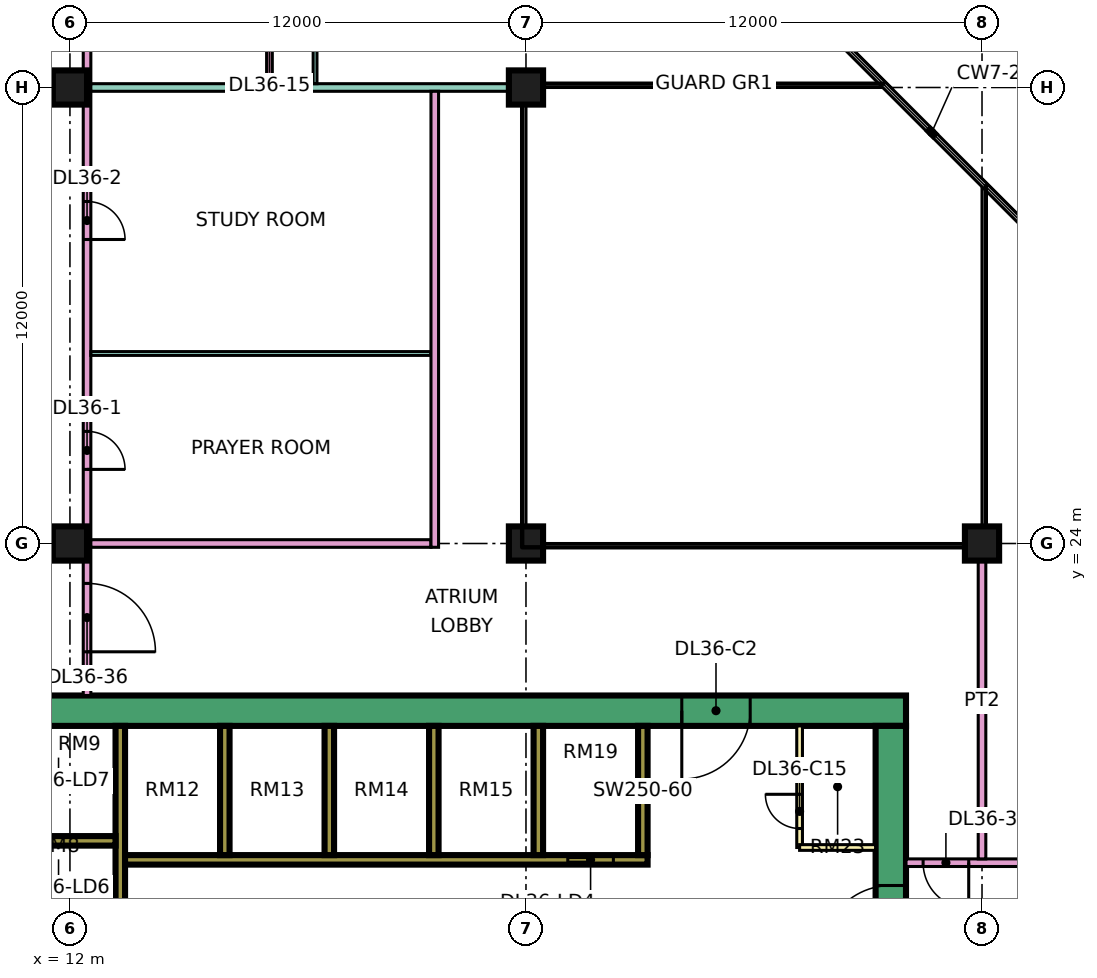
"""IFC4 building model, lengths in metres.
Left out: names, types, materials, properties, quantities, classifications, styles, units other than length and angle.
Written with IfcOpenShell. Run it as: python <this file> out.ifc"""

import sys

from ifc_helpers import new_model, si_unit, direction, frame, frame_2d, origin, origin_2d, place, context, subcontext, project, spatial, rectangle, extrude, element, fill, save


model = new_model("IFC4")
c1 = context("Model", 3, precision=1e-05, world=origin(), true_north=direction((0.0, 1.0)))
c2 = subcontext(c1, "Body", "Model", "MODEL_VIEW")
j1 = project(units=[si_unit("LENGTHUNIT", "METRE"), si_unit("PLANEANGLEUNIT", "RADIAN")], contexts=[c1])
p1 = place(None, origin())
s1 = spatial("IfcSite", under=j1, at=p1, CompositionType="ELEMENT")
p2 = place(p1, origin())
s2 = spatial("IfcBuilding", under=s1, at=p2, CompositionType="ELEMENT")
p3 = place(p2, frame((0.0, 0.0, 161.15)))
s3 = spatial("IfcBuildingStorey", under=s2, at=p3, CompositionType="ELEMENT", Elevation=161.15)
for number, where, z_axis, x_axis in (
    (1, (12.0, 24.0, 0.0), (0.0, 0.0, 1.0), (1.0, 0.0, 0.0)),
    (2, (12.0, 36.0, 0.0), (0.0, 0.0, 1.0), (1.0, 0.0, 0.0)),
    (3, (24.0, 24.0, 0.0), (0.0, 0.0, 1.0), (1.0, 0.0, 0.0)),
    (4, (24.0, 36.0, 0.0), (0.0, 0.0, 1.0), (1.0, 0.0, 0.0)),
    (5, (36.0, 24.0, 0.0), (0.0, 0.0, 1.0), (1.0, 0.0, 0.0)),
):
    element("IfcColumn", number, at=place(p3, frame(where, z_axis=z_axis, x_axis=x_axis)), inside=s3, PredefinedType="COLUMN", context=c2, shape_type="SweptSolid", body=[
        extrude(rectangle(XDim=0.9, YDim=0.9, at=origin_2d()), origin(), (0.0, 0.0, 1.0), 3.75),
    ])
p4 = place(p3, frame((9.0, 19.6, 0.0), z_axis=(0.0, 0.0, 1.0), x_axis=(1.0, 0.0, 0.0)))
e6 = element("IfcWall", 6, at=p4, inside=s3, PredefinedType="SHEAR", context=c2, shape_type="SweptSolid", body=[
    extrude(rectangle(XDim=25.0, YDim=0.8, at=frame_2d((12.5, 0.0))), origin(), (0.0, 0.0, 1.0), 3.75),
])
p5 = place(p4, frame((19.1, 0.0, 0.0)))
e7 = element("IfcOpeningElement", 7, at=p5, cuts=e6, PredefinedType="OPENING", context=c2, shape_type="SweptSolid", body=[
    extrude(rectangle(XDim=1.8, YDim=2.4, at=frame_2d((0.9, 1.2))), frame((0.0, 0.41, 0.0), z_axis=(0.0, -1.0, 0.0), x_axis=(1.0, 0.0, 0.0)), (0.0, 0.0, 1.0), 0.82),
])
p6 = place(p3, frame((33.6, 7.8, 0.0), z_axis=(0.0, 0.0, 1.0), x_axis=(0.0, 1.0, 0.0)))
e8 = element("IfcWall", 8, at=p6, inside=s3, PredefinedType="SHEAR", context=c2, shape_type="SweptSolid", body=[
    extrude(rectangle(XDim=11.4, YDim=0.8, at=frame_2d((5.7, 0.0))), origin(), (0.0, 0.0, 1.0), 3.75),
])
p7 = place(p6, frame((5.4, 0.0, 0.0)))
e9 = element("IfcOpeningElement", 9, at=p7, cuts=e8, PredefinedType="OPENING", context=c2, shape_type="SweptSolid", body=[
    extrude(rectangle(XDim=1.8, YDim=2.4, at=frame_2d((0.9, 1.2))), frame((0.0, 0.41, 0.0), z_axis=(0.0, -1.0, 0.0), x_axis=(1.0, 0.0, 0.0)), (0.0, 0.0, 1.0), 0.82),
])
p8 = place(p3, frame((13.325, 7.8, 0.0), z_axis=(0.0, 0.0, 1.0), x_axis=(0.0, 1.0, 0.0)))
e10 = element("IfcWall", 10, at=p8, inside=s3, PredefinedType="SHEAR", context=c2, shape_type="SweptSolid", body=[
    extrude(rectangle(XDim=11.4, YDim=0.25, at=frame_2d((5.7, 0.0))), origin(), (0.0, 0.0, 1.0), 3.75),
])
p9 = place(p3, frame((13.45, 15.675, 0.0), z_axis=(0.0, 0.0, 1.0), x_axis=(1.0, 0.0, 0.0)))
e11 = element("IfcWall", 11, at=p9, inside=s3, PredefinedType="SHEAR", context=c2, shape_type="SweptSolid", body=[
    extrude(rectangle(XDim=13.75, YDim=0.25, at=frame_2d((6.875, 0.0))), origin(), (0.0, 0.0, 1.0), 3.75),
])
p10 = place(p9, frame((11.65, 0.0, 0.0)))
e12 = element("IfcOpeningElement", 12, at=p10, cuts=e11, PredefinedType="OPENING", context=c2, shape_type="SweptSolid", body=[
    extrude(rectangle(XDim=1.2, YDim=2.2, at=frame_2d((0.6, 1.1))), frame((0.0, 0.135, 0.0), z_axis=(0.0, -1.0, 0.0), x_axis=(1.0, 0.0, 0.0)), (0.0, 0.0, 1.0), 0.27),
])
p11 = place(p3, frame((10.2, 16.175, 0.0), z_axis=(0.0, 0.0, 1.0), x_axis=(1.0, 0.0, 0.0)))
e13 = element("IfcWall", 13, at=p11, inside=s3, PredefinedType="SHEAR", context=c2, shape_type="SweptSolid", body=[
    extrude(rectangle(XDim=3.0, YDim=0.25, at=frame_2d((1.5, 0.0))), origin(), (0.0, 0.0, 1.0), 3.75),
])
for number, where, z_axis, x_axis in (
    (14, (16.075, 15.8, 0.0), (0.0, 0.0, 1.0), (0.0, 1.0, 0.0)),
    (15, (18.825, 15.8, 0.0), (0.0, 0.0, 1.0), (0.0, 1.0, 0.0)),
    (16, (21.575, 15.8, 0.0), (0.0, 0.0, 1.0), (0.0, 1.0, 0.0)),
    (17, (24.325, 15.8, 0.0), (0.0, 0.0, 1.0), (0.0, 1.0, 0.0)),
    (18, (27.075, 15.8, 0.0), (0.0, 0.0, 1.0), (0.0, 1.0, 0.0)),
):
    element("IfcWall", number, at=place(p3, frame(where, z_axis=z_axis, x_axis=x_axis)), inside=s3, PredefinedType="SHEAR", context=c2, shape_type="SweptSolid", body=[
        extrude(rectangle(XDim=3.4, YDim=0.25, at=frame_2d((1.7, 0.0))), origin(), (0.0, 0.0, 1.0), 3.75),
    ])
p12 = place(p3, frame((31.2, 16.0, 0.0), z_axis=(0.0, 0.0, 1.0), x_axis=(0.0, 1.0, 0.0)))
e19 = element("IfcWall", 19, at=p12, inside=s3, PredefinedType="PARTITIONING", context=c2, shape_type="SweptSolid", body=[
    extrude(rectangle(XDim=3.2, YDim=0.15, at=frame_2d((1.6, 0.0))), origin(), (0.0, 0.0, 1.0), 3.35),
])
p13 = place(p12, frame((0.5, 0.0, 0.0)))
e20 = element("IfcOpeningElement", 20, at=p13, cuts=e19, PredefinedType="OPENING", context=c2, shape_type="SweptSolid", body=[
    extrude(rectangle(XDim=0.9, YDim=2.1, at=frame_2d((0.45, 1.05))), frame((0.0, 0.085, 0.0), z_axis=(0.0, -1.0, 0.0), x_axis=(1.0, 0.0, 0.0)), (0.0, 0.0, 1.0), 0.17),
])
p14 = place(p3, frame((31.2, 16.0, 0.0), z_axis=(0.0, 0.0, 1.0), x_axis=(1.0, 0.0, 0.0)))
e21 = element("IfcWall", 21, at=p14, inside=s3, PredefinedType="PARTITIONING", context=c2, shape_type="SweptSolid", body=[
    extrude(rectangle(XDim=2.0, YDim=0.15, at=frame_2d((1.0, 0.0))), origin(), (0.0, 0.0, 1.0), 3.35),
])
p15 = place(p3, frame((12.45, 20.0, 0.0), z_axis=(0.0, 0.0, 1.0), x_axis=(0.0, 1.0, 0.0)))
e22 = element("IfcWall", 22, at=p15, inside=s3, PredefinedType="PARTITIONING", context=c2, shape_type="SweptSolid", body=[
    extrude(rectangle(XDim=43.0, YDim=0.2, at=frame_2d((21.5, 0.0))), origin(), (0.0, 0.0, 1.0), 3.35),
])
p16 = place(p15, frame((5.95, 0.0, 0.0)))
e23 = element("IfcOpeningElement", 23, at=p16, cuts=e22, PredefinedType="OPENING", context=c2, shape_type="SweptSolid", body=[
    extrude(rectangle(XDim=1.0, YDim=2.1, at=frame_2d((0.5, 1.05))), frame((0.0, 0.11, 0.0), z_axis=(0.0, -1.0, 0.0), x_axis=(1.0, 0.0, 0.0)), (0.0, 0.0, 1.0), 0.22),
])
p17 = place(p15, frame((12.0, 0.0, 0.0)))
e24 = element("IfcOpeningElement", 24, at=p17, cuts=e22, PredefinedType="OPENING", context=c2, shape_type="SweptSolid", body=[
    extrude(rectangle(XDim=1.0, YDim=2.1, at=frame_2d((0.5, 1.05))), frame((0.0, 0.11, 0.0), z_axis=(0.0, -1.0, 0.0), x_axis=(1.0, 0.0, 0.0)), (0.0, 0.0, 1.0), 0.22),
])
p18 = place(p15, frame((23.35, 0.0, 0.0)))
e25 = element("IfcOpeningElement", 25, at=p18, cuts=e22, PredefinedType="OPENING", context=c2, shape_type="SweptSolid", body=[
    extrude(rectangle(XDim=1.0, YDim=2.1, at=frame_2d((0.5, 1.05))), frame((0.0, 0.11, 0.0), z_axis=(0.0, -1.0, 0.0), x_axis=(1.0, 0.0, 0.0)), (0.0, 0.0, 1.0), 0.22),
])
p19 = place(p15, frame((35.2, 0.0, 0.0)))
e26 = element("IfcOpeningElement", 26, at=p19, cuts=e22, PredefinedType="OPENING", context=c2, shape_type="SweptSolid", body=[
    extrude(rectangle(XDim=1.0, YDim=2.1, at=frame_2d((0.5, 1.05))), frame((0.0, 0.11, 0.0), z_axis=(0.0, -1.0, 0.0), x_axis=(1.0, 0.0, 0.0)), (0.0, 0.0, 1.0), 0.22),
])
p20 = place(p15, frame((1.15, 0.0, 0.0)))
e27 = element("IfcOpeningElement", 27, at=p20, cuts=e22, PredefinedType="OPENING", context=c2, shape_type="SweptSolid", body=[
    extrude(rectangle(XDim=1.8, YDim=2.1, at=frame_2d((0.9, 1.05))), frame((0.0, 0.11, 0.0), z_axis=(0.0, -1.0, 0.0), x_axis=(1.0, 0.0, 0.0)), (0.0, 0.0, 1.0), 0.22),
])
p21 = place(p15, frame((28.6, 0.0, 0.0)))
e28 = element("IfcOpeningElement", 28, at=p21, cuts=e22, PredefinedType="OPENING", context=c2, shape_type="SweptSolid", body=[
    extrude(rectangle(XDim=1.8, YDim=2.1, at=frame_2d((0.9, 1.05))), frame((0.0, 0.11, 0.0), z_axis=(0.0, -1.0, 0.0), x_axis=(1.0, 0.0, 0.0)), (0.0, 0.0, 1.0), 0.22),
])
p22 = place(p3, frame((12.55, 24.0, 0.0), z_axis=(0.0, 0.0, 1.0), x_axis=(1.0, 0.0, 0.0)))
e29 = element("IfcWall", 29, at=p22, inside=s3, PredefinedType="PARTITIONING", context=c2, shape_type="SweptSolid", body=[
    extrude(rectangle(XDim=8.95, YDim=0.2, at=frame_2d((4.475, 0.0))), origin(), (0.0, 0.0, 1.0), 3.35),
])
p23 = place(p3, frame((12.55, 29.0, 0.0), z_axis=(0.0, 0.0, 1.0), x_axis=(1.0, 0.0, 0.0)))
e30 = element("IfcWall", 30, at=p23, inside=s3, PredefinedType="PARTITIONING", context=c2, shape_type="SweptSolid", body=[
    extrude(rectangle(XDim=8.95, YDim=0.1, at=frame_2d((4.475, 0.0))), origin(), (0.0, 0.0, 1.0), 3.35),
])
p24 = place(p3, frame((12.55, 36.0, 0.0), z_axis=(0.0, 0.0, 1.0), x_axis=(1.0, 0.0, 0.0)))
e31 = element("IfcWall", 31, at=p24, inside=s3, PredefinedType="PARTITIONING", context=c2, shape_type="SweptSolid", body=[
    extrude(rectangle(XDim=11.45, YDim=0.2, at=frame_2d((5.725, 0.0))), origin(), (0.0, 0.0, 1.0), 3.35),
])
p25 = place(p3, frame((17.25, 36.1, 0.0), z_axis=(0.0, 0.0, 1.0), x_axis=(0.0, 1.0, 0.0)))
e32 = element("IfcWall", 32, at=p25, inside=s3, PredefinedType="PARTITIONING", context=c2, shape_type="SweptSolid", body=[
    extrude(rectangle(XDim=6.575, YDim=0.15, at=frame_2d((3.288, 0.0))), origin(), (0.0, 0.0, 1.0), 3.35),
])
p26 = place(p25, frame((1.1, 0.0, 0.0)))
e33 = element("IfcOpeningElement", 33, at=p26, cuts=e32, PredefinedType="OPENING", context=c2, shape_type="SweptSolid", body=[
    extrude(rectangle(XDim=0.9, YDim=2.1, at=frame_2d((0.45, 1.05))), frame((0.0, 0.085, 0.0), z_axis=(0.0, -1.0, 0.0), x_axis=(1.0, 0.0, 0.0)), (0.0, 0.0, 1.0), 0.17),
])
p27 = place(p3, frame((18.45, 36.1, 0.0), z_axis=(0.0, 0.0, 1.0), x_axis=(0.0, 1.0, 0.0)))
e34 = element("IfcWall", 34, at=p27, inside=s3, PredefinedType="PARTITIONING", context=c2, shape_type="SweptSolid", body=[
    extrude(rectangle(XDim=2.85, YDim=0.1, at=frame_2d((1.425, 0.0))), origin(), (0.0, 0.0, 1.0), 3.35),
])
p28 = place(p27, frame((0.95, 0.0, 0.0)))
e35 = element("IfcOpeningElement", 35, at=p28, cuts=e34, PredefinedType="OPENING", context=c2, shape_type="SweptSolid", body=[
    extrude(rectangle(XDim=0.9, YDim=2.1, at=frame_2d((0.45, 1.05))), frame((0.0, 0.06, 0.0), z_axis=(0.0, -1.0, 0.0), x_axis=(1.0, 0.0, 0.0)), (0.0, 0.0, 1.0), 0.12),
])
p29 = place(p3, frame((21.6, 23.9, 0.0), z_axis=(0.0, 0.0, 1.0), x_axis=(0.0, 1.0, 0.0)))
e36 = element("IfcWall", 36, at=p29, inside=s3, PredefinedType="PARTITIONING", context=c2, shape_type="SweptSolid", body=[
    extrude(rectangle(XDim=12.0, YDim=0.2, at=frame_2d((6.0, 0.0))), origin(), (0.0, 0.0, 1.0), 3.35),
])
p30 = place(p3, frame((34.0, 15.6, 0.0), z_axis=(0.0, 0.0, 1.0), x_axis=(1.0, 0.0, 0.0)))
e37 = element("IfcWall", 37, at=p30, inside=s3, PredefinedType="PARTITIONING", context=c2, shape_type="SweptSolid", body=[
    extrude(rectangle(XDim=10.35, YDim=0.2, at=frame_2d((5.175, 0.0))), origin(), (0.0, 0.0, 1.0), 3.35),
])
p31 = place(p30, frame((5.6, 0.0, 0.0)))
e38 = element("IfcOpeningElement", 38, at=p31, cuts=e37, PredefinedType="OPENING", context=c2, shape_type="SweptSolid", body=[
    extrude(rectangle(XDim=1.0, YDim=2.1, at=frame_2d((0.5, 1.05))), frame((0.0, 0.11, 0.0), z_axis=(0.0, -1.0, 0.0), x_axis=(1.0, 0.0, 0.0)), (0.0, 0.0, 1.0), 0.22),
])
p32 = place(p30, frame((0.45, 0.0, 0.0)))
e39 = element("IfcOpeningElement", 39, at=p32, cuts=e37, PredefinedType="OPENING", context=c2, shape_type="SweptSolid", body=[
    extrude(rectangle(XDim=1.2, YDim=2.1, at=frame_2d((0.6, 1.05))), frame((0.0, 0.11, 0.0), z_axis=(0.0, -1.0, 0.0), x_axis=(1.0, 0.0, 0.0)), (0.0, 0.0, 1.0), 0.22),
])
p33 = place(p3, frame((36.0, 15.7, 0.0), z_axis=(0.0, 0.0, 1.0), x_axis=(0.0, 1.0, 0.0)))
e40 = element("IfcWall", 40, at=p33, inside=s3, PredefinedType="PARTITIONING", context=c2, shape_type="SweptSolid", body=[
    extrude(rectangle(XDim=8.3, YDim=0.2, at=frame_2d((4.15, 0.0))), origin(), (0.0, 0.0, 1.0), 3.35),
])
p34 = place(p10, origin())
e41 = element("IfcDoor", 41, at=p34, inside=s3, OperationType="DOUBLE_DOOR_SLIDING", PredefinedType="DOOR", context=c2, shape_type="SweptSolid", body=[
    extrude(rectangle(XDim=1.2, YDim=2.2, at=frame_2d((0.6, 1.1))), frame((0.0, 0.025, 0.0), z_axis=(0.0, -1.0, 0.0), x_axis=(1.0, 0.0, 0.0)), (0.0, 0.0, 1.0), 0.05),
])
fill(e12, e41)
p35 = place(p7, origin())
e42 = element("IfcDoor", 42, at=p35, inside=s3, OperationType="DOUBLE_DOOR_SINGLE_SWING", PredefinedType="DOOR", context=c2, shape_type="SweptSolid", body=[
    extrude(rectangle(XDim=1.8, YDim=2.4, at=frame_2d((0.9, 1.2))), frame((0.0, 0.025, 0.0), z_axis=(0.0, -1.0, 0.0), x_axis=(1.0, 0.0, 0.0)), (0.0, 0.0, 1.0), 0.05),
])
fill(e9, e42)
p36 = place(p5, frame((1.8, 0.0, 0.0), z_axis=(0.0, 0.0, 1.0), x_axis=(-1.0, 0.0, 0.0)))
e43 = element("IfcDoor", 43, at=p36, inside=s3, OperationType="DOUBLE_DOOR_SINGLE_SWING", PredefinedType="DOOR", context=c2, shape_type="SweptSolid", body=[
    extrude(rectangle(XDim=1.8, YDim=2.4, at=frame_2d((0.9, 1.2))), frame((0.0, 0.025, 0.0), z_axis=(0.0, -1.0, 0.0), x_axis=(1.0, 0.0, 0.0)), (0.0, 0.0, 1.0), 0.05),
])
fill(e7, e43)
p37 = place(p13, frame((0.9, 0.0, 0.0), z_axis=(0.0, 0.0, 1.0), x_axis=(-1.0, 0.0, 0.0)))
e44 = element("IfcDoor", 44, at=p37, inside=s3, OperationType="SINGLE_SWING_RIGHT", PredefinedType="DOOR", context=c2, shape_type="SweptSolid", body=[
    extrude(rectangle(XDim=0.9, YDim=2.1, at=frame_2d((0.45, 1.05))), frame((0.0, 0.025, 0.0), z_axis=(0.0, -1.0, 0.0), x_axis=(1.0, 0.0, 0.0)), (0.0, 0.0, 1.0), 0.05),
])
fill(e20, e44)
p38 = place(p16, frame((1.0, 0.0, 0.0), z_axis=(0.0, 0.0, 1.0), x_axis=(-1.0, 0.0, 0.0)))
e45 = element("IfcDoor", 45, at=p38, inside=s3, OperationType="SINGLE_SWING_LEFT", PredefinedType="DOOR", context=c2, shape_type="SweptSolid", body=[
    extrude(rectangle(XDim=1.0, YDim=2.1, at=frame_2d((0.5, 1.05))), frame((0.0, 0.025, 0.0), z_axis=(0.0, -1.0, 0.0), x_axis=(1.0, 0.0, 0.0)), (0.0, 0.0, 1.0), 0.05),
])
fill(e23, e45)
p39 = place(p17, frame((1.0, 0.0, 0.0), z_axis=(0.0, 0.0, 1.0), x_axis=(-1.0, 0.0, 0.0)))
e46 = element("IfcDoor", 46, at=p39, inside=s3, OperationType="SINGLE_SWING_LEFT", PredefinedType="DOOR", context=c2, shape_type="SweptSolid", body=[
    extrude(rectangle(XDim=1.0, YDim=2.1, at=frame_2d((0.5, 1.05))), frame((0.0, 0.025, 0.0), z_axis=(0.0, -1.0, 0.0), x_axis=(1.0, 0.0, 0.0)), (0.0, 0.0, 1.0), 0.05),
])
fill(e24, e46)
p40 = place(p32, origin())
e47 = element("IfcDoor", 47, at=p40, inside=s3, OperationType="SINGLE_SWING_RIGHT", PredefinedType="DOOR", context=c2, shape_type="SweptSolid", body=[
    extrude(rectangle(XDim=1.2, YDim=2.1, at=frame_2d((0.6, 1.05))), frame((0.0, 0.025, 0.0), z_axis=(0.0, -1.0, 0.0), x_axis=(1.0, 0.0, 0.0)), (0.0, 0.0, 1.0), 0.05),
])
fill(e39, e47)
p41 = place(p20, frame((1.8, 0.0, 0.0), z_axis=(0.0, 0.0, 1.0), x_axis=(-1.0, 0.0, 0.0)))
e48 = element("IfcDoor", 48, at=p41, inside=s3, OperationType="DOUBLE_DOOR_SINGLE_SWING", PredefinedType="DOOR", context=c2, shape_type="SweptSolid", body=[
    extrude(rectangle(XDim=1.8, YDim=2.1, at=frame_2d((0.9, 1.05))), frame((0.0, 0.025, 0.0), z_axis=(0.0, -1.0, 0.0), x_axis=(1.0, 0.0, 0.0)), (0.0, 0.0, 1.0), 0.05),
])
fill(e27, e48)
save(model, sys.argv[1])
